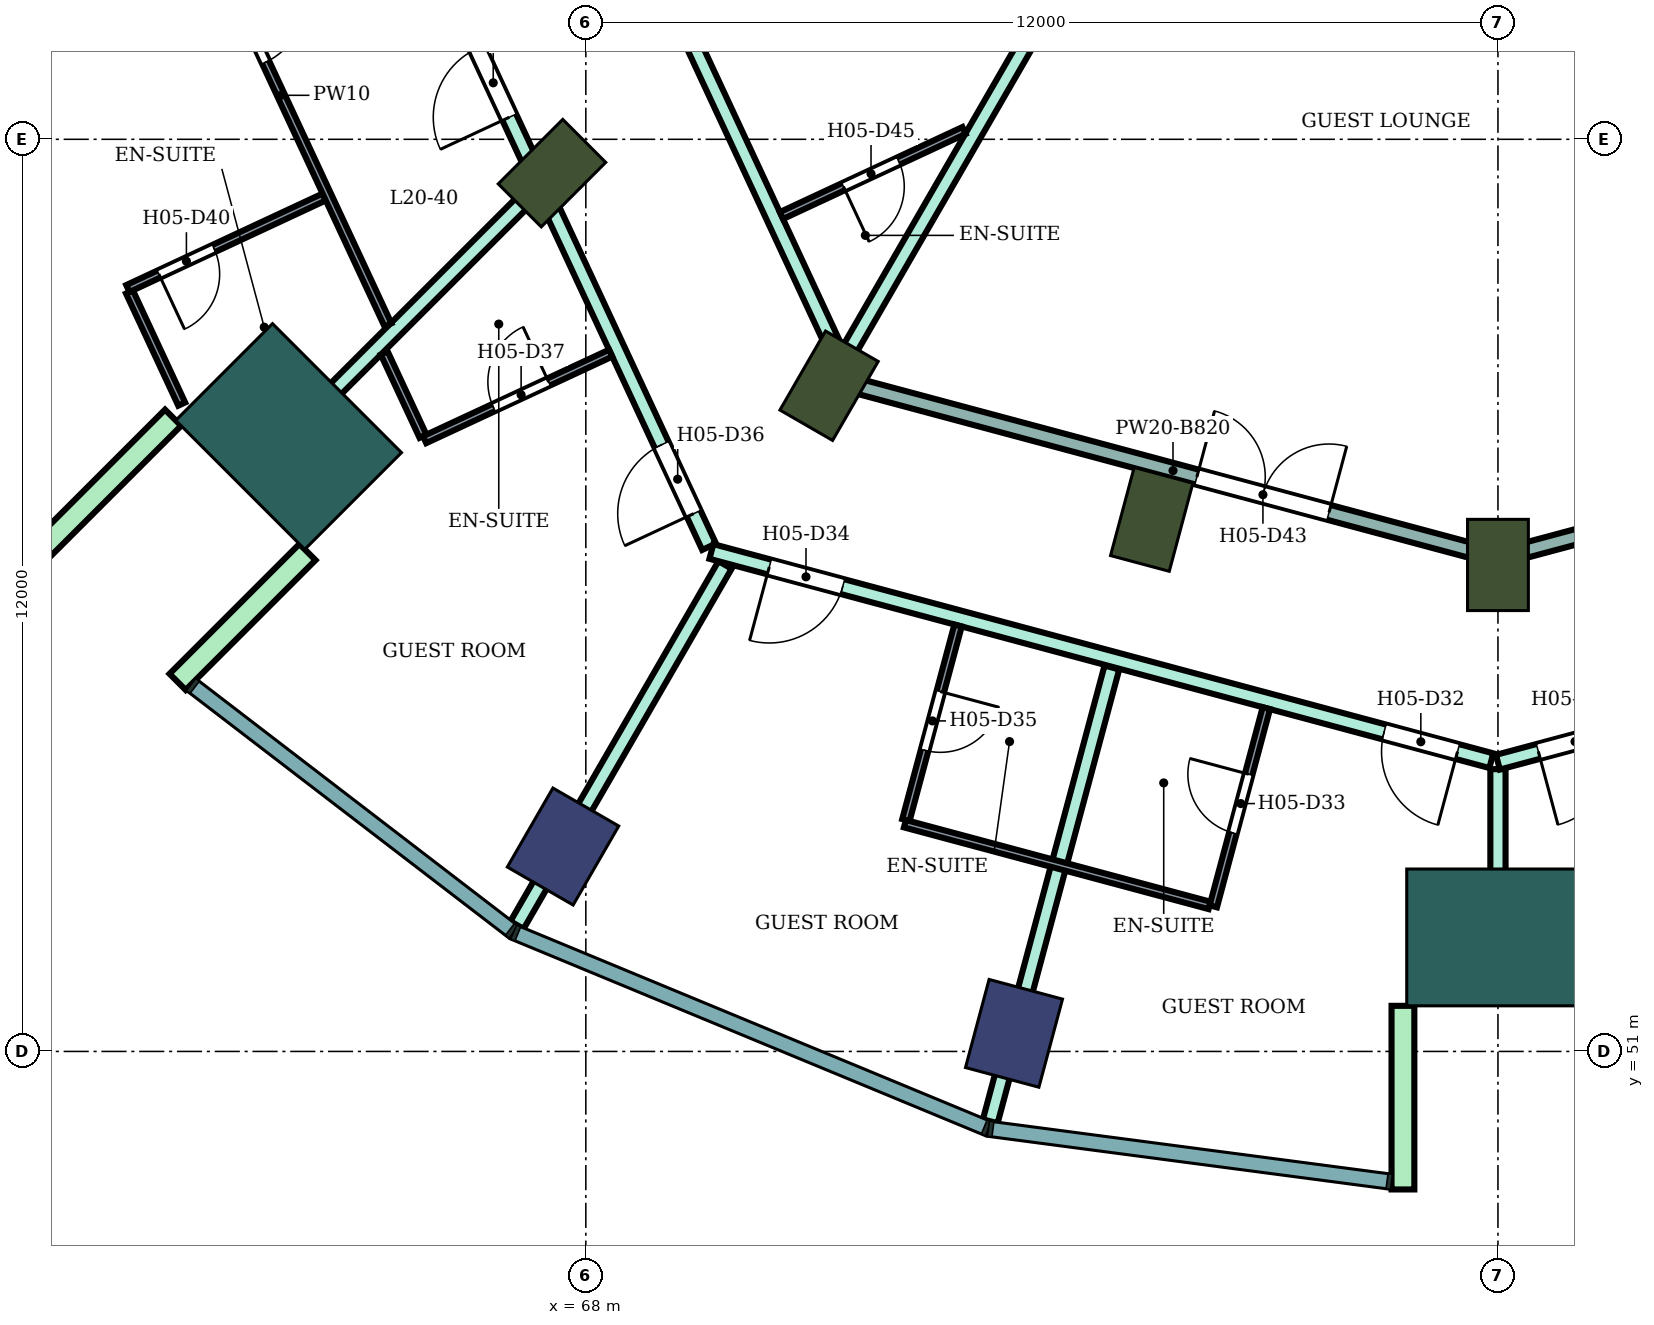
"""IFC4 building model, lengths in metres.
Left out: names, types, materials, properties, quantities, classifications, styles, units other than length and angle.
Written with IfcOpenShell. Run it as: python <this file> out.ifc"""

import sys

from ifc_helpers import new_model, si_unit, direction, frame, frame_2d, origin, origin_2d, place, context, subcontext, project, spatial, rectangle, extrude, element, fill, save


model = new_model("IFC4")
c1 = context("Model", 3, precision=1e-05, world=origin(), true_north=direction((0.0, 1.0)))
c2 = subcontext(c1, "Body", "Model", "MODEL_VIEW")
j1 = project(units=[si_unit("LENGTHUNIT", "METRE"), si_unit("PLANEANGLEUNIT", "RADIAN")], contexts=[c1])
p1 = place(None, origin())
s1 = spatial("IfcSite", under=j1, at=p1, CompositionType="ELEMENT")
p2 = place(p1, origin())
s2 = spatial("IfcBuilding", under=s1, at=p2, CompositionType="ELEMENT")
p3 = place(p2, frame((0.0, 0.0, 90.0)))
s3 = spatial("IfcBuildingStorey", under=s2, at=p3, CompositionType="ELEMENT", Elevation=90.0)
for number, where, z_axis, x_axis in (
    (1, (67.7, 53.696, 0.0), (0.0, 0.0, 1.0), (-0.5, -0.866, 0.0)),
    (2, (73.633, 51.238, 0.0), (0.0, 0.0, 1.0), (-0.259, -0.966, 0.0)),
):
    element("IfcColumn", number, at=place(p3, frame(where, z_axis=z_axis, x_axis=x_axis)), inside=s3, PredefinedType="COLUMN", context=c2, shape_type="SweptSolid", body=[
        extrude(rectangle(XDim=1.2, YDim=1.0, at=origin_2d()), origin(), (0.0, 0.0, 1.0), 3.8),
    ])
for number, where, z_axis, x_axis in (
    (3, (67.555, 62.555, 0.0), (0.0, 0.0, 1.0), (-0.707, -0.707, 0.0)),
    (4, (71.2, 59.758, 0.0), (0.0, 0.0, 1.0), (-0.5, -0.866, 0.0)),
    (5, (75.445, 58.0, 0.0), (0.0, 0.0, 1.0), (-0.259, -0.966, 0.0)),
    (6, (80.0, 57.4, 0.0), (0.0, 0.0, 1.0), (0.0, -1.0, 0.0)),
):
    element("IfcColumn", number, at=place(p3, frame(where, z_axis=z_axis, x_axis=x_axis)), inside=s3, PredefinedType="COLUMN", context=c2, shape_type="SweptSolid", body=[
        extrude(rectangle(XDim=1.2, YDim=0.8, at=origin_2d()), origin(), (0.0, 0.0, 1.0), 3.8),
    ])
for number, where, z_axis, x_axis in (
    (7, (64.09, 59.09, 0.0), (0.0, 0.0, 1.0), (-0.707, -0.707, 0.0)),
    (8, (80.0, 52.5, 0.0), (0.0, 0.0, 1.0), (0.0, -1.0, 0.0)),
):
    element("IfcColumn", number, at=place(p3, frame(where, z_axis=z_axis, x_axis=x_axis)), inside=s3, PredefinedType="COLUMN", context=c2, shape_type="SweptSolid", body=[
        extrude(rectangle(XDim=1.8, YDim=2.4, at=origin_2d()), origin(), (0.0, 0.0, 1.0), 3.8),
    ])
for number, where, z_axis, x_axis in (
    (9, (62.57, 59.338, 0.0), (0.0, 0.0, 1.0), (-0.707, -0.707, 0.0)),
    (10, (64.338, 57.57, 0.0), (0.0, 0.0, 1.0), (-0.707, -0.707, 0.0)),
    (11, (78.75, 51.6, 0.0), (0.0, 0.0, 1.0), (0.0, -1.0, 0.0)),
):
    element("IfcWall", number, at=place(p3, frame(where, z_axis=z_axis, x_axis=x_axis)), inside=s3, PredefinedType="NOTDEFINED", context=c2, shape_type="SweptSolid", body=[
        extrude(rectangle(XDim=2.416, YDim=0.3, at=frame_2d((1.208, 0.0))), origin(), (0.0, 0.0, 1.0), 3.8),
    ])
p4 = place(p3, frame((63.593, 58.599, 0.0), z_axis=(0.0, 0.0, 1.0), x_axis=(0.707292874152, 0.706920639233, 0.0)))
e12 = element("IfcWall", 12, at=p4, inside=s3, PredefinedType="PARTITIONING", context=c2, shape_type="SweptSolid", body=[
    extrude(rectangle(XDim=5.247, YDim=0.2, at=frame_2d((2.624, 0.0))), origin(), (0.0, 0.0, 1.0), 3.35),
])
p5 = place(p3, frame((66.15, 65.1, 0.0), z_axis=(0.0, 0.0, 1.0), x_axis=(0.421874842351, -0.906654078131, 0.0)))
e13 = element("IfcWall", 13, at=p5, inside=s3, PredefinedType="PARTITIONING", context=c2, shape_type="SweptSolid", body=[
    extrude(rectangle(XDim=8.228, YDim=0.2, at=frame_2d((4.114, 0.0))), origin(), (0.0, 0.0, 1.0), 3.35),
])
p6 = place(p5, frame((6.748, 0.0, 0.0)))
e14 = element("IfcOpeningElement", 14, at=p6, cuts=e13, PredefinedType="OPENING", context=c2, shape_type="SweptSolid", body=[
    extrude(rectangle(XDim=1.0, YDim=2.1, at=frame_2d((0.5, 1.05))), frame((0.0, 0.11, 0.0), z_axis=(0.0, -1.0, 0.0), x_axis=(1.0, 0.0, 0.0)), (0.0, 0.0, 1.0), 0.22),
])
p7 = place(p5, frame((0.997, 0.0, 0.0)))
e15 = element("IfcOpeningElement", 15, at=p7, cuts=e13, PredefinedType="OPENING", context=c2, shape_type="SweptSolid", body=[
    extrude(rectangle(XDim=1.0, YDim=2.1, at=frame_2d((0.5, 1.05))), frame((0.0, 0.11, 0.0), z_axis=(0.0, -1.0, 0.0), x_axis=(1.0, 0.0, 0.0)), (0.0, 0.0, 1.0), 0.22),
])
p8 = place(p3, frame((67.094, 52.663, 0.0), z_axis=(0.0, 0.0, 1.0), x_axis=(0.50023225055, 0.865891272337, 0.0)))
e16 = element("IfcWall", 16, at=p8, inside=s3, PredefinedType="PARTITIONING", context=c2, shape_type="SweptSolid", body=[
    extrude(rectangle(XDim=5.472, YDim=0.2, at=frame_2d((2.736, 0.0))), origin(), (0.0, 0.0, 1.0), 3.35),
])
p9 = place(p3, frame((68.321, 66.6, 0.0), z_axis=(0.0, 0.0, 1.0), x_axis=(0.421914092414, -0.906635813666, 0.0)))
e17 = element("IfcWall", 17, at=p9, inside=s3, PredefinedType="PARTITIONING", context=c2, shape_type="SweptSolid", body=[
    extrude(rectangle(XDim=7.459, YDim=0.2, at=frame_2d((3.73, 0.0))), origin(), (0.0, 0.0, 1.0), 3.35),
])
p10 = place(p9, frame((0.7, 0.0, 0.0)))
e18 = element("IfcOpeningElement", 18, at=p10, cuts=e17, PredefinedType="OPENING", context=c2, shape_type="SweptSolid", body=[
    extrude(rectangle(XDim=1.0, YDim=2.1, at=frame_2d((0.5, 1.05))), frame((0.0, 0.11, 0.0), z_axis=(0.0, -1.0, 0.0), x_axis=(1.0, 0.0, 0.0)), (0.0, 0.0, 1.0), 0.22),
])
p11 = place(p3, frame((69.652, 57.578, 0.0), z_axis=(0.0, 0.0, 1.0), x_axis=(0.965857425723, -0.259074184695, 0.0)))
e19 = element("IfcWall", 19, at=p11, inside=s3, PredefinedType="PARTITIONING", context=c2, shape_type="SweptSolid", body=[
    extrude(rectangle(XDim=10.623, YDim=0.2, at=frame_2d((5.312, 0.0))), origin(), (0.0, 0.0, 1.0), 3.35),
])
p12 = place(p11, frame((9.163, 0.0, 0.0)))
e20 = element("IfcOpeningElement", 20, at=p12, cuts=e19, PredefinedType="OPENING", context=c2, shape_type="SweptSolid", body=[
    extrude(rectangle(XDim=1.0, YDim=2.1, at=frame_2d((0.5, 1.05))), frame((0.0, 0.11, 0.0), z_axis=(0.0, -1.0, 0.0), x_axis=(1.0, 0.0, 0.0)), (0.0, 0.0, 1.0), 0.22),
])
p13 = place(p11, frame((0.788, 0.0, 0.0)))
e21 = element("IfcOpeningElement", 21, at=p13, cuts=e19, PredefinedType="OPENING", context=c2, shape_type="SweptSolid", body=[
    extrude(rectangle(XDim=1.0, YDim=2.1, at=frame_2d((0.5, 1.05))), frame((0.0, 0.11, 0.0), z_axis=(0.0, -1.0, 0.0), x_axis=(1.0, 0.0, 0.0)), (0.0, 0.0, 1.0), 0.22),
])
p14 = place(p3, frame((71.459, 60.218, 0.0), z_axis=(0.0, 0.0, 1.0), x_axis=(0.500232027118, 0.865891401416, 0.0)))
e22 = element("IfcWall", 22, at=p14, inside=s3, PredefinedType="PARTITIONING", context=c2, shape_type="SweptSolid", body=[
    extrude(rectangle(XDim=9.372, YDim=0.2, at=frame_2d((4.686, 0.0))), origin(), (0.0, 0.0, 1.0), 3.35),
])
p15 = place(p3, frame((71.498, 59.774, 0.0), z_axis=(0.0, 0.0, 1.0), x_axis=(0.965911938046, -0.258870871168, 0.0)))
e23 = element("IfcWall", 23, at=p15, inside=s3, PredefinedType="PARTITIONING", context=c2, shape_type="SweptSolid", body=[
    extrude(rectangle(XDim=8.752, YDim=0.2, at=frame_2d((4.376, 0.0))), origin(), (0.0, 0.0, 1.0), 2.98),
])
p16 = place(p15, frame((4.701, 0.0, 0.0)))
e24 = element("IfcOpeningElement", 24, at=p16, cuts=e23, PredefinedType="OPENING", context=c2, shape_type="SweptSolid", body=[
    extrude(rectangle(XDim=1.8, YDim=2.1, at=frame_2d((0.9, 1.05))), frame((0.0, 0.11, 0.0), z_axis=(0.0, -1.0, 0.0), x_axis=(1.0, 0.0, 0.0)), (0.0, 0.0, 1.0), 0.22),
])
p17 = place(p3, frame((73.321, 50.081, 0.0), z_axis=(0.0, 0.0, 1.0), x_axis=(0.258886797764, 0.965907669471, 0.0)))
e25 = element("IfcWall", 25, at=p17, inside=s3, PredefinedType="PARTITIONING", context=c2, shape_type="SweptSolid", body=[
    extrude(rectangle(XDim=6.181, YDim=0.2, at=frame_2d((3.09, 0.0))), origin(), (0.0, 0.0, 1.0), 3.35),
])
p18 = place(p3, frame((80.0, 51.8, 0.0), z_axis=(0.0, 0.0, 1.0), x_axis=(0.0, 1.0, 0.0)))
e26 = element("IfcWall", 26, at=p18, inside=s3, PredefinedType="PARTITIONING", context=c2, shape_type="SweptSolid", body=[
    extrude(rectangle(XDim=2.914, YDim=0.2, at=frame_2d((1.457, 0.0))), origin(), (0.0, 0.0, 1.0), 3.35),
])
p19 = place(p3, frame((80.0, 54.805, 0.0), z_axis=(0.0, 0.0, 1.0), x_axis=(0.965962177934, 0.258683340788, 0.0)))
e27 = element("IfcWall", 27, at=p19, inside=s3, PredefinedType="PARTITIONING", context=c2, shape_type="SweptSolid", body=[
    extrude(rectangle(XDim=10.643, YDim=0.2, at=frame_2d((5.322, 0.0))), origin(), (0.0, 0.0, 1.0), 3.35),
])
p20 = place(p19, frame((8.925, 0.0, 0.0)))
e28 = element("IfcOpeningElement", 28, at=p20, cuts=e27, PredefinedType="OPENING", context=c2, shape_type="SweptSolid", body=[
    extrude(rectangle(XDim=1.0, YDim=2.1, at=frame_2d((0.5, 1.05))), frame((0.0, 0.11, 0.0), z_axis=(0.0, -1.0, 0.0), x_axis=(1.0, 0.0, 0.0)), (0.0, 0.0, 1.0), 0.22),
])
p21 = place(p19, frame((0.55, 0.0, 0.0)))
e29 = element("IfcOpeningElement", 29, at=p21, cuts=e27, PredefinedType="OPENING", context=c2, shape_type="SweptSolid", body=[
    extrude(rectangle(XDim=1.0, YDim=2.1, at=frame_2d((0.5, 1.05))), frame((0.0, 0.11, 0.0), z_axis=(0.0, -1.0, 0.0), x_axis=(1.0, 0.0, 0.0)), (0.0, 0.0, 1.0), 0.22),
])
p22 = place(p3, frame((80.0, 57.496, 0.0), z_axis=(0.0, 0.0, 1.0), x_axis=(0.96592471314, 0.258823199396, 0.0)))
e30 = element("IfcWall", 30, at=p22, inside=s3, PredefinedType="PARTITIONING", context=c2, shape_type="SweptSolid", body=[
    extrude(rectangle(XDim=8.732, YDim=0.2, at=frame_2d((4.366, 0.0))), origin(), (0.0, 0.0, 1.0), 2.98),
])
p23 = place(p3, frame((61.996, 60.992, 0.0), z_axis=(0.0, 0.0, 1.0), x_axis=(0.422318684634, -0.906447421867, 0.0)))
e31 = element("IfcWall", 31, at=p23, inside=s3, PredefinedType="PARTITIONING", context=c2, shape_type="SweptSolid", body=[
    extrude(rectangle(XDim=1.627, YDim=0.1, at=frame_2d((0.814, 0.0))), origin(), (0.0, 0.0, 1.0), 3.35),
])
p24 = place(p3, frame((61.975, 61.037, 0.0), z_axis=(0.0, 0.0, 1.0), x_axis=(0.906360368959, 0.422505481125, 0.0)))
e32 = element("IfcWall", 32, at=p24, inside=s3, PredefinedType="PARTITIONING", context=c2, shape_type="SweptSolid", body=[
    extrude(rectangle(XDim=2.849, YDim=0.1, at=frame_2d((1.425, 0.0))), origin(), (0.0, 0.0, 1.0), 3.35),
])
p25 = place(p24, frame((0.45, 0.0, 0.0)))
e33 = element("IfcOpeningElement", 33, at=p25, cuts=e32, PredefinedType="OPENING", context=c2, shape_type="SweptSolid", body=[
    extrude(rectangle(XDim=0.8, YDim=2.1, at=frame_2d((0.4, 1.05))), frame((0.0, 0.06, 0.0), z_axis=(0.0, -1.0, 0.0), x_axis=(1.0, 0.0, 0.0)), (0.0, 0.0, 1.0), 0.12),
])
p26 = place(p3, frame((62.582, 66.6, 0.0), z_axis=(0.0, 0.0, 1.0), x_axis=(0.422283870085, -0.906463641337, 0.0)))
e34 = element("IfcWall", 34, at=p26, inside=s3, PredefinedType="PARTITIONING", context=c2, shape_type="SweptSolid", body=[
    extrude(rectangle(XDim=6.666, YDim=0.1, at=frame_2d((3.333, 0.0))), origin(), (0.0, 0.0, 1.0), 3.35),
])
p27 = place(p26, frame((1.953, 0.0, 0.0)))
e35 = element("IfcOpeningElement", 35, at=p27, cuts=e34, PredefinedType="OPENING", context=c2, shape_type="SweptSolid", body=[
    extrude(rectangle(XDim=0.9, YDim=2.1, at=frame_2d((0.45, 1.05))), frame((0.0, 0.06, 0.0), z_axis=(0.0, -1.0, 0.0), x_axis=(1.0, 0.0, 0.0)), (0.0, 0.0, 1.0), 0.12),
])
p28 = place(p3, frame((65.348, 60.188, 0.0), z_axis=(0.0, 0.0, 1.0), x_axis=(0.422387529151, -0.906415343657, 0.0)))
e36 = element("IfcWall", 36, at=p28, inside=s3, PredefinedType="PARTITIONING", context=c2, shape_type="SweptSolid", body=[
    extrude(rectangle(XDim=1.208, YDim=0.1, at=frame_2d((0.604, 0.0))), origin(), (0.0, 0.0, 1.0), 3.35),
])
p29 = place(p3, frame((65.879, 59.048, 0.0), z_axis=(0.0, 0.0, 1.0), x_axis=(0.906746039995, 0.421677150144, 0.0)))
e37 = element("IfcWall", 37, at=p29, inside=s3, PredefinedType="PARTITIONING", context=c2, shape_type="SweptSolid", body=[
    extrude(rectangle(XDim=2.7, YDim=0.1, at=frame_2d((1.35, 0.0))), origin(), (0.0, 0.0, 1.0), 3.35),
])
p30 = place(p29, frame((1.0, 0.0, 0.0)))
e38 = element("IfcOpeningElement", 38, at=p30, cuts=e37, PredefinedType="OPENING", context=c2, shape_type="SweptSolid", body=[
    extrude(rectangle(XDim=0.8, YDim=2.1, at=frame_2d((0.4, 1.05))), frame((0.0, 0.06, 0.0), z_axis=(0.0, -1.0, 0.0), x_axis=(1.0, 0.0, 0.0)), (0.0, 0.0, 1.0), 0.12),
])
p31 = place(p3, frame((70.574, 61.997, 0.0), z_axis=(0.0, 0.0, 1.0), x_axis=(0.906503026865, 0.422199315826, 0.0)))
e39 = element("IfcWall", 39, at=p31, inside=s3, PredefinedType="PARTITIONING", context=c2, shape_type="SweptSolid", body=[
    extrude(rectangle(XDim=2.65, YDim=0.1, at=frame_2d((1.325, 0.0))), origin(), (0.0, 0.0, 1.0), 3.35),
])
p32 = place(p31, frame((0.9, 0.0, 0.0)))
e40 = element("IfcOpeningElement", 40, at=p32, cuts=e39, PredefinedType="OPENING", context=c2, shape_type="SweptSolid", body=[
    extrude(rectangle(XDim=0.8, YDim=2.1, at=frame_2d((0.4, 1.05))), frame((0.0, 0.06, 0.0), z_axis=(0.0, -1.0, 0.0), x_axis=(1.0, 0.0, 0.0)), (0.0, 0.0, 1.0), 0.12),
])
p33 = place(p3, frame((72.211, 54.044, 0.0), z_axis=(0.0, 0.0, 1.0), x_axis=(0.258866552082, 0.96591309558, 0.0)))
e41 = element("IfcWall", 41, at=p33, inside=s3, PredefinedType="PARTITIONING", context=c2, shape_type="SweptSolid", body=[
    extrude(rectangle(XDim=2.65, YDim=0.1, at=frame_2d((1.325, 0.0))), origin(), (0.0, 0.0, 1.0), 3.35),
])
p34 = place(p33, frame((0.95, 0.0, 0.0)))
e42 = element("IfcOpeningElement", 42, at=p34, cuts=e41, PredefinedType="OPENING", context=c2, shape_type="SweptSolid", body=[
    extrude(rectangle(XDim=0.8, YDim=2.1, at=frame_2d((0.4, 1.05))), frame((0.0, 0.06, 0.0), z_axis=(0.0, -1.0, 0.0), x_axis=(1.0, 0.0, 0.0)), (0.0, 0.0, 1.0), 0.12),
])
p35 = place(p3, frame((72.198, 53.996, 0.0), z_axis=(0.0, 0.0, 1.0), x_axis=(0.965855045962, -0.259083056549, 0.0)))
e43 = element("IfcWall", 43, at=p35, inside=s3, PredefinedType="PARTITIONING", context=c2, shape_type="SweptSolid", body=[
    extrude(rectangle(XDim=4.15, YDim=0.1, at=frame_2d((2.075, 0.0))), origin(), (0.0, 0.0, 1.0), 3.35),
])
p36 = place(p3, frame((76.255, 52.909, 0.0), z_axis=(0.0, 0.0, 1.0), x_axis=(0.25867580527, 0.965964195904, 0.0)))
e44 = element("IfcWall", 44, at=p36, inside=s3, PredefinedType="PARTITIONING", context=c2, shape_type="SweptSolid", body=[
    extrude(rectangle(XDim=2.699, YDim=0.1, at=frame_2d((1.35, 0.0))), origin(), (0.0, 0.0, 1.0), 3.35),
])
p37 = place(p36, frame((1.0, 0.0, 0.0)))
e45 = element("IfcOpeningElement", 45, at=p37, cuts=e44, PredefinedType="OPENING", context=c2, shape_type="SweptSolid", body=[
    extrude(rectangle(XDim=0.8, YDim=2.1, at=frame_2d((0.4, 1.05))), frame((0.0, 0.06, 0.0), z_axis=(0.0, -1.0, 0.0), x_axis=(1.0, 0.0, 0.0)), (0.0, 0.0, 1.0), 0.12),
])
p38 = place(p21, frame((1.0, 0.0, 0.0), z_axis=(0.0, 0.0, 1.0), x_axis=(-1.0, 0.0, 0.0)))
e46 = element("IfcDoor", 46, at=p38, inside=s3, OperationType="SINGLE_SWING_RIGHT", PredefinedType="DOOR", context=c2, shape_type="SweptSolid", body=[
    extrude(rectangle(XDim=1.0, YDim=2.1, at=frame_2d((0.5, 1.05))), frame((0.0, 0.025, 0.0), z_axis=(0.0, -1.0, 0.0), x_axis=(1.0, 0.0, 0.0)), (0.0, 0.0, 1.0), 0.05),
])
fill(e29, e46)
p39 = place(p12, frame((1.0, 0.0, 0.0), z_axis=(0.0, 0.0, 1.0), x_axis=(-1.0, 0.0, 0.0)))
e47 = element("IfcDoor", 47, at=p39, inside=s3, OperationType="SINGLE_SWING_LEFT", PredefinedType="DOOR", context=c2, shape_type="SweptSolid", body=[
    extrude(rectangle(XDim=1.0, YDim=2.1, at=frame_2d((0.5, 1.05))), frame((0.0, 0.025, 0.0), z_axis=(0.0, -1.0, 0.0), x_axis=(1.0, 0.0, 0.0)), (0.0, 0.0, 1.0), 0.05),
])
fill(e20, e47)
p40 = place(p37, origin())
e48 = element("IfcDoor", 48, at=p40, inside=s3, OperationType="SINGLE_SWING_RIGHT", PredefinedType="DOOR", context=c2, shape_type="SweptSolid", body=[
    extrude(rectangle(XDim=0.8, YDim=2.1, at=frame_2d((0.4, 1.05))), frame((0.0, 0.025, 0.0), z_axis=(0.0, -1.0, 0.0), x_axis=(1.0, 0.0, 0.0)), (0.0, 0.0, 1.0), 0.05),
])
fill(e45, e48)
p41 = place(p13, frame((1.0, 0.0, 0.0), z_axis=(0.0, 0.0, 1.0), x_axis=(-1.0, 0.0, 0.0)))
e49 = element("IfcDoor", 49, at=p41, inside=s3, OperationType="SINGLE_SWING_RIGHT", PredefinedType="DOOR", context=c2, shape_type="SweptSolid", body=[
    extrude(rectangle(XDim=1.0, YDim=2.1, at=frame_2d((0.5, 1.05))), frame((0.0, 0.025, 0.0), z_axis=(0.0, -1.0, 0.0), x_axis=(1.0, 0.0, 0.0)), (0.0, 0.0, 1.0), 0.05),
])
fill(e21, e49)
p42 = place(p34, frame((0.8, 0.0, 0.0), z_axis=(0.0, 0.0, 1.0), x_axis=(-1.0, 0.0, 0.0)))
e50 = element("IfcDoor", 50, at=p42, inside=s3, OperationType="SINGLE_SWING_LEFT", PredefinedType="DOOR", context=c2, shape_type="SweptSolid", body=[
    extrude(rectangle(XDim=0.8, YDim=2.1, at=frame_2d((0.4, 1.05))), frame((0.0, 0.025, 0.0), z_axis=(0.0, -1.0, 0.0), x_axis=(1.0, 0.0, 0.0)), (0.0, 0.0, 1.0), 0.05),
])
fill(e42, e50)
p43 = place(p6, frame((1.0, 0.0, 0.0), z_axis=(0.0, 0.0, 1.0), x_axis=(-1.0, 0.0, 0.0)))
e51 = element("IfcDoor", 51, at=p43, inside=s3, OperationType="SINGLE_SWING_LEFT", PredefinedType="DOOR", context=c2, shape_type="SweptSolid", body=[
    extrude(rectangle(XDim=1.0, YDim=2.1, at=frame_2d((0.5, 1.05))), frame((0.0, 0.025, 0.0), z_axis=(0.0, -1.0, 0.0), x_axis=(1.0, 0.0, 0.0)), (0.0, 0.0, 1.0), 0.05),
])
fill(e14, e51)
p44 = place(p30, origin())
e52 = element("IfcDoor", 52, at=p44, inside=s3, OperationType="SINGLE_SWING_RIGHT", PredefinedType="DOOR", context=c2, shape_type="SweptSolid", body=[
    extrude(rectangle(XDim=0.8, YDim=2.1, at=frame_2d((0.4, 1.05))), frame((0.0, 0.025, 0.0), z_axis=(0.0, -1.0, 0.0), x_axis=(1.0, 0.0, 0.0)), (0.0, 0.0, 1.0), 0.05),
])
fill(e38, e52)
p45 = place(p7, frame((1.0, 0.0, 0.0), z_axis=(0.0, 0.0, 1.0), x_axis=(-1.0, 0.0, 0.0)))
e53 = element("IfcDoor", 53, at=p45, inside=s3, OperationType="SINGLE_SWING_LEFT", PredefinedType="DOOR", context=c2, shape_type="SweptSolid", body=[
    extrude(rectangle(XDim=1.0, YDim=2.1, at=frame_2d((0.5, 1.05))), frame((0.0, 0.025, 0.0), z_axis=(0.0, -1.0, 0.0), x_axis=(1.0, 0.0, 0.0)), (0.0, 0.0, 1.0), 0.05),
])
fill(e15, e53)
p46 = place(p27, origin())
e54 = element("IfcDoor", 54, at=p46, inside=s3, OperationType="SINGLE_SWING_LEFT", PredefinedType="DOOR", context=c2, shape_type="SweptSolid", body=[
    extrude(rectangle(XDim=0.9, YDim=2.1, at=frame_2d((0.45, 1.05))), frame((0.0, 0.025, 0.0), z_axis=(0.0, -1.0, 0.0), x_axis=(1.0, 0.0, 0.0)), (0.0, 0.0, 1.0), 0.05),
])
fill(e35, e54)
p47 = place(p25, frame((0.8, 0.0, 0.0), z_axis=(0.0, 0.0, 1.0), x_axis=(-1.0, 0.0, 0.0)))
e55 = element("IfcDoor", 55, at=p47, inside=s3, OperationType="SINGLE_SWING_RIGHT", PredefinedType="DOOR", context=c2, shape_type="SweptSolid", body=[
    extrude(rectangle(XDim=0.8, YDim=2.1, at=frame_2d((0.4, 1.05))), frame((0.0, 0.025, 0.0), z_axis=(0.0, -1.0, 0.0), x_axis=(1.0, 0.0, 0.0)), (0.0, 0.0, 1.0), 0.05),
])
fill(e33, e55)
p48 = place(p16, origin())
e56 = element("IfcDoor", 56, at=p48, inside=s3, OperationType="DOUBLE_DOOR_SINGLE_SWING", PredefinedType="DOOR", context=c2, shape_type="SweptSolid", body=[
    extrude(rectangle(XDim=1.8, YDim=2.1, at=frame_2d((0.9, 1.05))), frame((0.0, 0.025, 0.0), z_axis=(0.0, -1.0, 0.0), x_axis=(1.0, 0.0, 0.0)), (0.0, 0.0, 1.0), 0.05),
])
fill(e24, e56)
p49 = place(p32, frame((0.8, 0.0, 0.0), z_axis=(0.0, 0.0, 1.0), x_axis=(-1.0, 0.0, 0.0)))
e57 = element("IfcDoor", 57, at=p49, inside=s3, OperationType="SINGLE_SWING_RIGHT", PredefinedType="DOOR", context=c2, shape_type="SweptSolid", body=[
    extrude(rectangle(XDim=0.8, YDim=2.1, at=frame_2d((0.4, 1.05))), frame((0.0, 0.025, 0.0), z_axis=(0.0, -1.0, 0.0), x_axis=(1.0, 0.0, 0.0)), (0.0, 0.0, 1.0), 0.05),
])
fill(e40, e57)
save(model, sys.argv[1])
